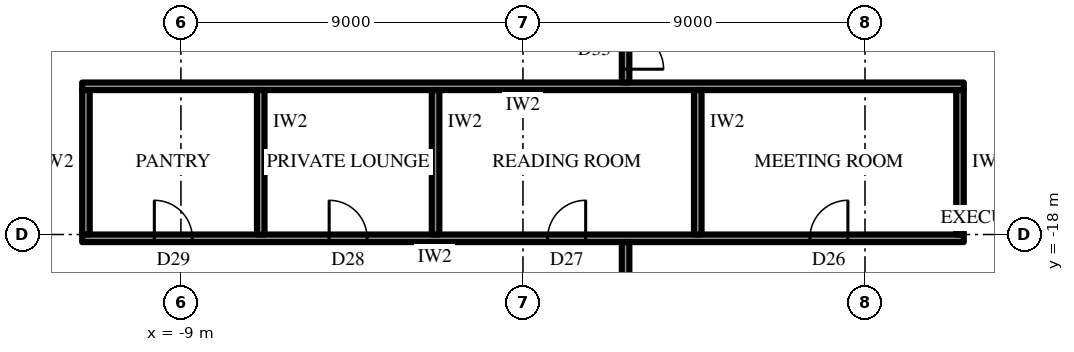
"""IFC4 building model, lengths in metres.
Left out: names, types, materials, properties, quantities, classifications, styles, units other than length and angle.
Written with IfcOpenShell. Run it as: python <this file> out.ifc"""

import sys

from ifc_helpers import new_model, si_unit, direction, frame, frame_2d, origin, place, context, subcontext, project, spatial, rectangle, extrude, element, fill, save


model = new_model("IFC4")
c1 = context("Model", 3, precision=1e-05, world=origin(), true_north=direction((0.0, 1.0)))
c2 = subcontext(c1, "Body", "Model", "MODEL_VIEW")
j1 = project(units=[si_unit("LENGTHUNIT", "METRE"), si_unit("PLANEANGLEUNIT", "RADIAN")], contexts=[c1])
p1 = place(None, origin())
s1 = spatial("IfcSite", under=j1, at=p1, CompositionType="ELEMENT")
p2 = place(p1, origin())
s2 = spatial("IfcBuilding", under=s1, at=p2, CompositionType="ELEMENT")
p3 = place(p2, frame((0.0, 0.0, 336.7)))
s3 = spatial("IfcBuildingStorey", under=s2, at=p3, CompositionType="ELEMENT", Elevation=336.7)
p4 = place(p3, frame((11.6, -14.1, 0.0), z_axis=(0.0, 0.0, 1.0), x_axis=(-1.0, 0.0, 0.0)))
e1 = element("IfcWall", 1, at=p4, inside=s3, PredefinedType="PARTITIONING", context=c2, shape_type="SweptSolid", body=[
    extrude(rectangle(XDim=23.2, YDim=0.2, at=frame_2d((11.6, 0.0))), origin(), (0.0, 0.0, 1.0), 4.0),
])
p5 = place(p3, frame((11.6, -18.1, 0.0), z_axis=(0.0, 0.0, 1.0), x_axis=(-1.0, 0.0, 0.0)))
e2 = element("IfcWall", 2, at=p5, inside=s3, PredefinedType="PARTITIONING", context=c2, shape_type="SweptSolid", body=[
    extrude(rectangle(XDim=23.2, YDim=0.2, at=frame_2d((11.6, 0.0))), origin(), (0.0, 0.0, 1.0), 4.0),
])
p6 = place(p5, frame((3.05, 0.0, 0.0)))
e3 = element("IfcOpeningElement", 3, at=p6, cuts=e2, PredefinedType="OPENING", context=c2, shape_type="SweptSolid", body=[
    extrude(rectangle(XDim=1.0, YDim=2.2, at=frame_2d((0.5, 1.1))), frame((0.0, 0.11, 0.0), z_axis=(0.0, -1.0, 0.0), x_axis=(1.0, 0.0, 0.0)), (0.0, 0.0, 1.0), 0.22),
])
p7 = place(p5, frame((9.95, 0.0, 0.0)))
e4 = element("IfcOpeningElement", 4, at=p7, cuts=e2, PredefinedType="OPENING", context=c2, shape_type="SweptSolid", body=[
    extrude(rectangle(XDim=1.0, YDim=2.2, at=frame_2d((0.5, 1.1))), frame((0.0, 0.11, 0.0), z_axis=(0.0, -1.0, 0.0), x_axis=(1.0, 0.0, 0.0)), (0.0, 0.0, 1.0), 0.22),
])
p8 = place(p5, frame((15.7, 0.0, 0.0)))
e5 = element("IfcOpeningElement", 5, at=p8, cuts=e2, PredefinedType="OPENING", context=c2, shape_type="SweptSolid", body=[
    extrude(rectangle(XDim=1.0, YDim=2.2, at=frame_2d((0.5, 1.1))), frame((0.0, 0.11, 0.0), z_axis=(0.0, -1.0, 0.0), x_axis=(1.0, 0.0, 0.0)), (0.0, 0.0, 1.0), 0.22),
])
p9 = place(p5, frame((20.3, 0.0, 0.0)))
e6 = element("IfcOpeningElement", 6, at=p9, cuts=e2, PredefinedType="OPENING", context=c2, shape_type="SweptSolid", body=[
    extrude(rectangle(XDim=1.0, YDim=2.2, at=frame_2d((0.5, 1.1))), frame((0.0, 0.11, 0.0), z_axis=(0.0, -1.0, 0.0), x_axis=(1.0, 0.0, 0.0)), (0.0, 0.0, 1.0), 0.22),
])
for number, where, z_axis, x_axis in (
    (7, (11.5, -14.2, 0.0), (0.0, 0.0, 1.0), (0.0, -1.0, 0.0)),
    (8, (4.6, -14.2, 0.0), (0.0, 0.0, 1.0), (0.0, -1.0, 0.0)),
    (9, (-2.3, -14.2, 0.0), (0.0, 0.0, 1.0), (0.0, -1.0, 0.0)),
    (10, (-6.9, -14.2, 0.0), (0.0, 0.0, 1.0), (0.0, -1.0, 0.0)),
    (11, (-11.5, -14.2, 0.0), (0.0, 0.0, 1.0), (0.0, -1.0, 0.0)),
):
    element("IfcWall", number, at=place(p3, frame(where, z_axis=z_axis, x_axis=x_axis)), inside=s3, PredefinedType="PARTITIONING", context=c2, shape_type="SweptSolid", body=[
        extrude(rectangle(XDim=3.8, YDim=0.2, at=frame_2d((1.9, 0.0))), origin(), (0.0, 0.0, 1.0), 4.0),
    ])
p10 = place(p3, frame((2.7, -12.3, 0.0), z_axis=(0.0, 0.0, 1.0), x_axis=(0.0, -1.0, 0.0)))
e12 = element("IfcWall", 12, at=p10, inside=s3, PredefinedType="PARTITIONING", context=c2, shape_type="SweptSolid", body=[
    extrude(rectangle(XDim=1.7, YDim=0.2, at=frame_2d((0.85, 0.0))), origin(), (0.0, 0.0, 1.0), 4.0),
])
p11 = place(p10, frame((0.35, 0.0, 0.0)))
e13 = element("IfcOpeningElement", 13, at=p11, cuts=e12, PredefinedType="OPENING", context=c2, shape_type="SweptSolid", body=[
    extrude(rectangle(XDim=1.0, YDim=2.2, at=frame_2d((0.5, 1.1))), frame((0.0, 0.11, 0.0), z_axis=(0.0, -1.0, 0.0), x_axis=(1.0, 0.0, 0.0)), (0.0, 0.0, 1.0), 0.22),
])
p12 = place(p3, frame((2.7, -18.2, 0.0), z_axis=(0.0, 0.0, 1.0), x_axis=(0.0, -1.0, 0.0)))
e14 = element("IfcWall", 14, at=p12, inside=s3, PredefinedType="PARTITIONING", context=c2, shape_type="SweptSolid", body=[
    extrude(rectangle(XDim=8.35, YDim=0.2, at=frame_2d((4.175, 0.0))), origin(), (0.0, 0.0, 1.0), 4.0),
])
p13 = place(p6, frame((1.0, 0.0, 0.0), z_axis=(0.0, 0.0, 1.0), x_axis=(-1.0, 0.0, 0.0)))
e15 = element("IfcDoor", 15, at=p13, inside=s3, OperationType="SINGLE_SWING_LEFT", PredefinedType="DOOR", context=c2, shape_type="SweptSolid", body=[
    extrude(rectangle(XDim=1.0, YDim=2.2, at=frame_2d((0.5, 1.1))), frame((0.0, 0.025, 0.0), z_axis=(0.0, -1.0, 0.0), x_axis=(1.0, 0.0, 0.0)), (0.0, 0.0, 1.0), 0.05),
])
fill(e3, e15)
p14 = place(p7, frame((1.0, 0.0, 0.0), z_axis=(0.0, 0.0, 1.0), x_axis=(-1.0, 0.0, 0.0)))
e16 = element("IfcDoor", 16, at=p14, inside=s3, OperationType="SINGLE_SWING_LEFT", PredefinedType="DOOR", context=c2, shape_type="SweptSolid", body=[
    extrude(rectangle(XDim=1.0, YDim=2.2, at=frame_2d((0.5, 1.1))), frame((0.0, 0.025, 0.0), z_axis=(0.0, -1.0, 0.0), x_axis=(1.0, 0.0, 0.0)), (0.0, 0.0, 1.0), 0.05),
])
fill(e4, e16)
p15 = place(p8, frame((1.0, 0.0, 0.0), z_axis=(0.0, 0.0, 1.0), x_axis=(-1.0, 0.0, 0.0)))
e17 = element("IfcDoor", 17, at=p15, inside=s3, OperationType="SINGLE_SWING_RIGHT", PredefinedType="DOOR", context=c2, shape_type="SweptSolid", body=[
    extrude(rectangle(XDim=1.0, YDim=2.2, at=frame_2d((0.5, 1.1))), frame((0.0, 0.025, 0.0), z_axis=(0.0, -1.0, 0.0), x_axis=(1.0, 0.0, 0.0)), (0.0, 0.0, 1.0), 0.05),
])
fill(e5, e17)
p16 = place(p9, frame((1.0, 0.0, 0.0), z_axis=(0.0, 0.0, 1.0), x_axis=(-1.0, 0.0, 0.0)))
e18 = element("IfcDoor", 18, at=p16, inside=s3, OperationType="SINGLE_SWING_RIGHT", PredefinedType="DOOR", context=c2, shape_type="SweptSolid", body=[
    extrude(rectangle(XDim=1.0, YDim=2.2, at=frame_2d((0.5, 1.1))), frame((0.0, 0.025, 0.0), z_axis=(0.0, -1.0, 0.0), x_axis=(1.0, 0.0, 0.0)), (0.0, 0.0, 1.0), 0.05),
])
fill(e6, e18)
p17 = place(p11, origin())
e19 = element("IfcDoor", 19, at=p17, inside=s3, OperationType="SINGLE_SWING_LEFT", PredefinedType="DOOR", context=c2, shape_type="SweptSolid", body=[
    extrude(rectangle(XDim=1.0, YDim=2.2, at=frame_2d((0.5, 1.1))), frame((0.0, 0.025, 0.0), z_axis=(0.0, -1.0, 0.0), x_axis=(1.0, 0.0, 0.0)), (0.0, 0.0, 1.0), 0.05),
])
fill(e13, e19)
save(model, sys.argv[1])
